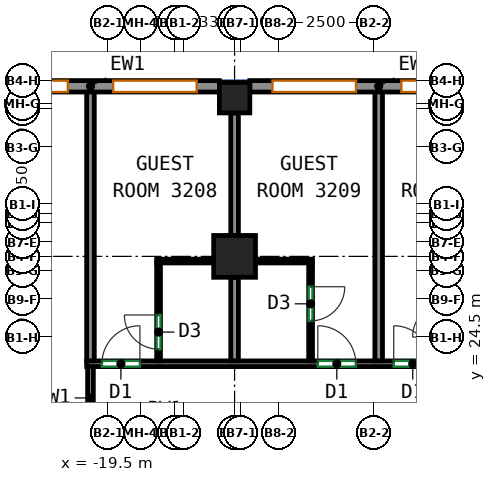
"""IFC4 building model, lengths in metres.
Left out: names, types, materials, properties, quantities, classifications, styles, units other than length and angle.
Written with IfcOpenShell. Run it as: python <this file> out.ifc"""

import sys

from ifc_helpers import new_model, si_unit, direction, frame, frame_2d, origin, origin_2d, place, context, subcontext, project, spatial, rectangle, extrude, source, transform, mapped, element, fill, save


model = new_model("IFC4")
c1 = context("Model", 3, precision=1e-05, world=origin(), true_north=direction((0.0, 1.0)))
c2 = subcontext(c1, "Body", "Model", "MODEL_VIEW")
j1 = project(units=[si_unit("LENGTHUNIT", "METRE"), si_unit("PLANEANGLEUNIT", "RADIAN")], contexts=[c1])
p1 = place(None, origin())
s1 = spatial("IfcSite", under=j1, at=p1, CompositionType="ELEMENT")
p2 = place(p1, origin())
s2 = spatial("IfcBuilding", under=s1, at=p2, CompositionType="ELEMENT")
p3 = place(p2, frame((0.0, 0.0, 143.9)))
s3 = spatial("IfcBuildingStorey", under=s2, at=p3, CompositionType="ELEMENT", Elevation=143.9)
m1 = source(origin(), c2, "Body", "SweptSolid", [
    extrude(rectangle(XDim=1.1, YDim=1.1, at=origin_2d()), origin(), (0.0, 0.0, 1.0), 3.12),
])
p4 = place(p3, frame((-16.167, 26.625, 0.0), z_axis=(0.0, 0.0, 1.0), x_axis=(1.0, 0.0, 0.0)))
e1 = element("IfcColumn", 1, at=p4, inside=s3, PredefinedType="COLUMN", context=c2, shape_type="MappedRepresentation", body=[
    mapped(m1, transform((0.0, 0.0, 0.0))),
])
m2 = source(origin(), c2, "Body", "SweptSolid", [
    extrude(rectangle(XDim=0.8, YDim=0.8, at=origin_2d()), origin(), (0.0, 0.0, 1.0), 3.12),
])
p5 = place(p3, frame((-16.167, 30.8, 0.0), z_axis=(0.0, 0.0, 1.0), x_axis=(1.0, 0.0, 0.0)))
e2 = element("IfcColumn", 2, at=p5, inside=s3, PredefinedType="COLUMN", context=c2, shape_type="MappedRepresentation", body=[
    mapped(m2, transform((0.0, 0.0, 0.0))),
])
m3 = source(origin(), c2, "Body", "SweptSolid", [
    extrude(rectangle(XDim=6.783, YDim=0.3, at=frame_2d((3.392, 0.0))), origin(), (0.0, 0.0, 1.0), 3.12),
])
p6 = place(p3, frame((-8.983, 31.1, 0.0), z_axis=(0.0, 0.0, 1.0), x_axis=(-1.0, 0.0, 0.0)))
e3 = element("IfcWall", 3, at=p6, inside=s3, PredefinedType="SOLIDWALL", context=c2, shape_type="MappedRepresentation", body=[
    mapped(m3, transform((0.0, 0.0, 0.0))),
])
p7 = place(p6, frame((0.596, 0.0, 0.85)))
e4 = element("IfcOpeningElement", 4, at=p7, cuts=e3, PredefinedType="OPENING", context=c2, shape_type="SweptSolid", body=[
    extrude(rectangle(XDim=2.2, YDim=1.95, at=frame_2d((1.1, 0.975))), frame((0.0, 0.16, 0.0), z_axis=(0.0, -1.0, 0.0), x_axis=(1.0, 0.0, 0.0)), (0.0, 0.0, 1.0), 0.32),
])
p8 = place(p6, frame((3.988, 0.0, 0.85)))
e5 = element("IfcOpeningElement", 5, at=p8, cuts=e3, PredefinedType="OPENING", context=c2, shape_type="SweptSolid", body=[
    extrude(rectangle(XDim=2.2, YDim=1.95, at=frame_2d((1.1, 0.975))), frame((0.0, 0.16, 0.0), z_axis=(0.0, -1.0, 0.0), x_axis=(1.0, 0.0, 0.0)), (0.0, 0.0, 1.0), 0.32),
])
m4 = source(origin(), c2, "Body", "SweptSolid", [
    extrude(rectangle(XDim=6.783, YDim=0.3, at=frame_2d((3.392, 0.0))), origin(), (0.0, 0.0, 1.0), 3.12),
])
p9 = place(p3, frame((-16.567, 31.1, 0.0), z_axis=(0.0, 0.0, 1.0), x_axis=(-1.0, 0.0, 0.0)))
e6 = element("IfcWall", 6, at=p9, inside=s3, PredefinedType="SOLIDWALL", context=c2, shape_type="MappedRepresentation", body=[
    mapped(m4, transform((0.0, 0.0, 0.0))),
])
p10 = place(p9, frame((0.596, 0.0, 0.85)))
e7 = element("IfcOpeningElement", 7, at=p10, cuts=e6, PredefinedType="OPENING", context=c2, shape_type="SweptSolid", body=[
    extrude(rectangle(XDim=2.2, YDim=1.95, at=frame_2d((1.1, 0.975))), frame((0.0, 0.16, 0.0), z_axis=(0.0, -1.0, 0.0), x_axis=(1.0, 0.0, 0.0)), (0.0, 0.0, 1.0), 0.32),
])
p11 = place(p9, frame((3.988, 0.0, 0.85)))
e8 = element("IfcOpeningElement", 8, at=p11, cuts=e6, PredefinedType="OPENING", context=c2, shape_type="SweptSolid", body=[
    extrude(rectangle(XDim=2.2, YDim=1.95, at=frame_2d((1.1, 0.975))), frame((0.0, 0.16, 0.0), z_axis=(0.0, -1.0, 0.0), x_axis=(1.0, 0.0, 0.0)), (0.0, 0.0, 1.0), 0.32),
])
p12 = place(p3, frame((-19.959, 22.075, 0.0), z_axis=(0.0, 0.0, 1.0), x_axis=(0.0, 1.0, 0.0)))
e9 = element("IfcWall", 9, at=p12, inside=s3, PredefinedType="PARTITIONING", context=c2, shape_type="SweptSolid", body=[
    extrude(rectangle(XDim=1.65, YDim=0.15, at=frame_2d((0.825, 0.0))), origin(), (0.0, 0.0, 1.0), 3.12),
])
p13 = place(p3, frame((-20.059, 23.8, 0.0), z_axis=(0.0, 0.0, 1.0), x_axis=(1.0, 0.0, 0.0)))
e10 = element("IfcWall", 10, at=p13, inside=s3, PredefinedType="PARTITIONING", context=c2, shape_type="SweptSolid", body=[
    extrude(rectangle(XDim=41.909, YDim=0.15, at=frame_2d((20.955, 0.0))), origin(), (0.0, 0.0, 1.0), 3.12),
])
p14 = place(p13, frame((0.401, 0.0, 0.0)))
e11 = element("IfcOpeningElement", 11, at=p14, cuts=e10, PredefinedType="OPENING", context=c2, shape_type="SweptSolid", body=[
    extrude(rectangle(XDim=1.0, YDim=2.1, at=frame_2d((0.5, 1.05))), frame((0.0, 0.085, 0.0), z_axis=(0.0, -1.0, 0.0), x_axis=(1.0, 0.0, 0.0)), (0.0, 0.0, 1.0), 0.17),
])
p15 = place(p13, frame((6.082, 0.0, 0.0)))
e12 = element("IfcOpeningElement", 12, at=p15, cuts=e10, PredefinedType="OPENING", context=c2, shape_type="SweptSolid", body=[
    extrude(rectangle(XDim=1.0, YDim=2.1, at=frame_2d((0.5, 1.05))), frame((0.0, 0.085, 0.0), z_axis=(0.0, -1.0, 0.0), x_axis=(1.0, 0.0, 0.0)), (0.0, 0.0, 1.0), 0.17),
])
p16 = place(p13, frame((8.08, 0.0, 0.0)))
e13 = element("IfcOpeningElement", 13, at=p16, cuts=e10, PredefinedType="OPENING", context=c2, shape_type="SweptSolid", body=[
    extrude(rectangle(XDim=1.0, YDim=2.1, at=frame_2d((0.5, 1.05))), frame((0.0, 0.085, 0.0), z_axis=(0.0, -1.0, 0.0), x_axis=(1.0, 0.0, 0.0)), (0.0, 0.0, 1.0), 0.17),
])
p17 = place(p13, frame((13.769, 0.0, 0.0)))
e14 = element("IfcOpeningElement", 14, at=p17, cuts=e10, PredefinedType="OPENING", context=c2, shape_type="SweptSolid", body=[
    extrude(rectangle(XDim=1.0, YDim=2.1, at=frame_2d((0.5, 1.05))), frame((0.0, 0.085, 0.0), z_axis=(0.0, -1.0, 0.0), x_axis=(1.0, 0.0, 0.0)), (0.0, 0.0, 1.0), 0.17),
])
p18 = place(p13, frame((15.56, 0.0, 0.0)))
e15 = element("IfcOpeningElement", 15, at=p18, cuts=e10, PredefinedType="OPENING", context=c2, shape_type="SweptSolid", body=[
    extrude(rectangle(XDim=1.0, YDim=2.1, at=frame_2d((0.5, 1.05))), frame((0.0, 0.085, 0.0), z_axis=(0.0, -1.0, 0.0), x_axis=(1.0, 0.0, 0.0)), (0.0, 0.0, 1.0), 0.17),
])
p19 = place(p13, frame((21.625, 0.0, 0.0)))
e16 = element("IfcOpeningElement", 16, at=p19, cuts=e10, PredefinedType="OPENING", context=c2, shape_type="SweptSolid", body=[
    extrude(rectangle(XDim=1.0, YDim=2.1, at=frame_2d((0.5, 1.05))), frame((0.0, 0.085, 0.0), z_axis=(0.0, -1.0, 0.0), x_axis=(1.0, 0.0, 0.0)), (0.0, 0.0, 1.0), 0.17),
])
p20 = place(p13, frame((23.212, 0.0, 0.0)))
e17 = element("IfcOpeningElement", 17, at=p20, cuts=e10, PredefinedType="OPENING", context=c2, shape_type="SweptSolid", body=[
    extrude(rectangle(XDim=1.0, YDim=2.1, at=frame_2d((0.5, 1.05))), frame((0.0, 0.085, 0.0), z_axis=(0.0, -1.0, 0.0), x_axis=(1.0, 0.0, 0.0)), (0.0, 0.0, 1.0), 0.17),
])
p21 = place(p13, frame((29.038, 0.0, 0.0)))
e18 = element("IfcOpeningElement", 18, at=p21, cuts=e10, PredefinedType="OPENING", context=c2, shape_type="SweptSolid", body=[
    extrude(rectangle(XDim=1.0, YDim=2.1, at=frame_2d((0.5, 1.05))), frame((0.0, 0.085, 0.0), z_axis=(0.0, -1.0, 0.0), x_axis=(1.0, 0.0, 0.0)), (0.0, 0.0, 1.0), 0.17),
])
p22 = place(p13, frame((30.624, 0.0, 0.0)))
e19 = element("IfcOpeningElement", 19, at=p22, cuts=e10, PredefinedType="OPENING", context=c2, shape_type="SweptSolid", body=[
    extrude(rectangle(XDim=1.0, YDim=2.1, at=frame_2d((0.5, 1.05))), frame((0.0, 0.085, 0.0), z_axis=(0.0, -1.0, 0.0), x_axis=(1.0, 0.0, 0.0)), (0.0, 0.0, 1.0), 0.17),
])
p23 = place(p13, frame((36.622, 0.0, 0.0)))
e20 = element("IfcOpeningElement", 20, at=p23, cuts=e10, PredefinedType="OPENING", context=c2, shape_type="SweptSolid", body=[
    extrude(rectangle(XDim=1.0, YDim=2.1, at=frame_2d((0.5, 1.05))), frame((0.0, 0.085, 0.0), z_axis=(0.0, -1.0, 0.0), x_axis=(1.0, 0.0, 0.0)), (0.0, 0.0, 1.0), 0.17),
])
p24 = place(p13, frame((38.516, 0.0, 0.0)))
e21 = element("IfcOpeningElement", 21, at=p24, cuts=e10, PredefinedType="OPENING", context=c2, shape_type="SweptSolid", body=[
    extrude(rectangle(XDim=1.0, YDim=2.1, at=frame_2d((0.5, 1.05))), frame((0.0, 0.085, 0.0), z_axis=(0.0, -1.0, 0.0), x_axis=(1.0, 0.0, 0.0)), (0.0, 0.0, 1.0), 0.17),
])
p25 = place(p3, frame((-19.959, 23.877, 0.0), z_axis=(0.0, 0.0, 1.0), x_axis=(0.0, 1.0, 0.0)))
e22 = element("IfcWall", 22, at=p25, inside=s3, PredefinedType="PARTITIONING", context=c2, shape_type="SweptSolid", body=[
    extrude(rectangle(XDim=7.123, YDim=0.2, at=frame_2d((3.562, 0.0))), origin(), (0.0, 0.0, 1.0), 3.12),
])
p26 = place(p3, frame((-18.217, 26.502, 0.0), z_axis=(0.0, 0.0, 1.0), x_axis=(1.0, 0.0, 0.0)))
e23 = element("IfcWall", 23, at=p26, inside=s3, PredefinedType="PARTITIONING", context=c2, shape_type="SweptSolid", body=[
    extrude(rectangle(XDim=1.5, YDim=0.1, at=frame_2d((0.75, 0.0))), origin(), (0.0, 0.0, 1.0), 3.12),
])
p27 = place(p3, frame((-18.167, 23.877, 0.0), z_axis=(0.0, 0.0, 1.0), x_axis=(0.0, 1.0, 0.0)))
e24 = element("IfcWall", 24, at=p27, inside=s3, PredefinedType="PARTITIONING", context=c2, shape_type="SweptSolid", body=[
    extrude(rectangle(XDim=2.575, YDim=0.1, at=frame_2d((1.288, 0.0))), origin(), (0.0, 0.0, 1.0), 3.12),
])
p28 = place(p27, frame((0.306, 0.0, 0.0)))
e25 = element("IfcOpeningElement", 25, at=p28, cuts=e24, PredefinedType="OPENING", context=c2, shape_type="SweptSolid", body=[
    extrude(rectangle(XDim=0.9, YDim=2.1, at=frame_2d((0.45, 1.05))), frame((0.0, 0.06, 0.0), z_axis=(0.0, -1.0, 0.0), x_axis=(1.0, 0.0, 0.0)), (0.0, 0.0, 1.0), 0.12),
])
p29 = place(p3, frame((-16.167, 27.175, 0.0), z_axis=(0.0, 0.0, 1.0), x_axis=(0.0, 1.0, 0.0)))
e26 = element("IfcWall", 26, at=p29, inside=s3, PredefinedType="PARTITIONING", context=c2, shape_type="SweptSolid", body=[
    extrude(rectangle(XDim=3.225, YDim=0.2, at=frame_2d((1.612, 0.0))), origin(), (0.0, 0.0, 1.0), 3.12),
])
p30 = place(p3, frame((-16.167, 23.877, 0.0), z_axis=(0.0, 0.0, 1.0), x_axis=(0.0, 1.0, 0.0)))
e27 = element("IfcWall", 27, at=p30, inside=s3, PredefinedType="PARTITIONING", context=c2, shape_type="SweptSolid", body=[
    extrude(rectangle(XDim=2.198, YDim=0.2, at=frame_2d((1.099, 0.0))), origin(), (0.0, 0.0, 1.0), 3.12),
])
p31 = place(p3, frame((-15.617, 26.502, 0.0), z_axis=(0.0, 0.0, 1.0), x_axis=(1.0, 0.0, 0.0)))
e28 = element("IfcWall", 28, at=p31, inside=s3, PredefinedType="PARTITIONING", context=c2, shape_type="SweptSolid", body=[
    extrude(rectangle(XDim=1.5, YDim=0.1, at=frame_2d((0.75, 0.0))), origin(), (0.0, 0.0, 1.0), 3.12),
])
p32 = place(p3, frame((-14.167, 26.452, 0.0), z_axis=(0.0, 0.0, 1.0), x_axis=(0.0, -1.0, 0.0)))
e29 = element("IfcWall", 29, at=p32, inside=s3, PredefinedType="PARTITIONING", context=c2, shape_type="SweptSolid", body=[
    extrude(rectangle(XDim=2.575, YDim=0.1, at=frame_2d((1.288, 0.0))), origin(), (0.0, 0.0, 1.0), 3.12),
])
p33 = place(p32, frame((0.625, 0.0, 0.0)))
e30 = element("IfcOpeningElement", 30, at=p33, cuts=e29, PredefinedType="OPENING", context=c2, shape_type="SweptSolid", body=[
    extrude(rectangle(XDim=0.9, YDim=2.1, at=frame_2d((0.45, 1.05))), frame((0.0, 0.06, 0.0), z_axis=(0.0, -1.0, 0.0), x_axis=(1.0, 0.0, 0.0)), (0.0, 0.0, 1.0), 0.12),
])
p34 = place(p3, frame((-12.375, 23.877, 0.0), z_axis=(0.0, 0.0, 1.0), x_axis=(0.0, 1.0, 0.0)))
e31 = element("IfcWall", 31, at=p34, inside=s3, PredefinedType="PARTITIONING", context=c2, shape_type="SweptSolid", body=[
    extrude(rectangle(XDim=7.123, YDim=0.2, at=frame_2d((3.562, 0.0))), origin(), (0.0, 0.0, 1.0), 3.12),
])
p35 = place(p7, origin())
e32 = element("IfcWindow", 32, at=p35, inside=s3, PartitioningType="SINGLE_PANEL", PredefinedType="WINDOW", context=c2, shape_type="SweptSolid", body=[
    extrude(rectangle(XDim=2.2, YDim=1.95, at=frame_2d((1.1, 0.975))), frame((0.0, 0.03, 0.0), z_axis=(0.0, -1.0, 0.0), x_axis=(1.0, 0.0, 0.0)), (0.0, 0.0, 1.0), 0.06),
])
fill(e4, e32)
p36 = place(p8, origin())
e33 = element("IfcWindow", 33, at=p36, inside=s3, PartitioningType="SINGLE_PANEL", PredefinedType="WINDOW", context=c2, shape_type="SweptSolid", body=[
    extrude(rectangle(XDim=2.2, YDim=1.95, at=frame_2d((1.1, 0.975))), frame((0.0, 0.03, 0.0), z_axis=(0.0, -1.0, 0.0), x_axis=(1.0, 0.0, 0.0)), (0.0, 0.0, 1.0), 0.06),
])
fill(e5, e33)
p37 = place(p10, origin())
e34 = element("IfcWindow", 34, at=p37, inside=s3, PartitioningType="SINGLE_PANEL", PredefinedType="WINDOW", context=c2, shape_type="SweptSolid", body=[
    extrude(rectangle(XDim=2.2, YDim=1.95, at=frame_2d((1.1, 0.975))), frame((0.0, 0.03, 0.0), z_axis=(0.0, -1.0, 0.0), x_axis=(1.0, 0.0, 0.0)), (0.0, 0.0, 1.0), 0.06),
])
fill(e7, e34)
p38 = place(p11, origin())
e35 = element("IfcWindow", 35, at=p38, inside=s3, PartitioningType="SINGLE_PANEL", PredefinedType="WINDOW", context=c2, shape_type="SweptSolid", body=[
    extrude(rectangle(XDim=2.2, YDim=1.95, at=frame_2d((1.1, 0.975))), frame((0.0, 0.03, 0.0), z_axis=(0.0, -1.0, 0.0), x_axis=(1.0, 0.0, 0.0)), (0.0, 0.0, 1.0), 0.06),
])
fill(e8, e35)
p39 = place(p14, origin())
e36 = element("IfcDoor", 36, at=p39, inside=s3, OperationType="SINGLE_SWING_RIGHT", PredefinedType="DOOR", context=c2, shape_type="SweptSolid", body=[
    extrude(rectangle(XDim=1.0, YDim=2.1, at=frame_2d((0.5, 1.05))), frame((0.0, 0.025, 0.0), z_axis=(0.0, -1.0, 0.0), x_axis=(1.0, 0.0, 0.0)), (0.0, 0.0, 1.0), 0.05),
])
fill(e11, e36)
p40 = place(p15, origin())
e37 = element("IfcDoor", 37, at=p40, inside=s3, OperationType="SINGLE_SWING_LEFT", PredefinedType="DOOR", context=c2, shape_type="SweptSolid", body=[
    extrude(rectangle(XDim=1.0, YDim=2.1, at=frame_2d((0.5, 1.05))), frame((0.0, 0.025, 0.0), z_axis=(0.0, -1.0, 0.0), x_axis=(1.0, 0.0, 0.0)), (0.0, 0.0, 1.0), 0.05),
])
fill(e12, e37)
p41 = place(p16, origin())
e38 = element("IfcDoor", 38, at=p41, inside=s3, OperationType="SINGLE_SWING_LEFT", PredefinedType="DOOR", context=c2, shape_type="SweptSolid", body=[
    extrude(rectangle(XDim=1.0, YDim=2.1, at=frame_2d((0.5, 1.05))), frame((0.0, 0.025, 0.0), z_axis=(0.0, -1.0, 0.0), x_axis=(1.0, 0.0, 0.0)), (0.0, 0.0, 1.0), 0.05),
])
fill(e13, e38)
p42 = place(p28, origin())
e39 = element("IfcDoor", 39, at=p42, inside=s3, OperationType="SINGLE_SWING_RIGHT", PredefinedType="DOOR", context=c2, shape_type="SweptSolid", body=[
    extrude(rectangle(XDim=0.9, YDim=2.1, at=frame_2d((0.45, 1.05))), frame((0.0, 0.025, 0.0), z_axis=(0.0, -1.0, 0.0), x_axis=(1.0, 0.0, 0.0)), (0.0, 0.0, 1.0), 0.05),
])
fill(e25, e39)
p43 = place(p33, origin())
e40 = element("IfcDoor", 40, at=p43, inside=s3, OperationType="SINGLE_SWING_LEFT", PredefinedType="DOOR", context=c2, shape_type="SweptSolid", body=[
    extrude(rectangle(XDim=0.9, YDim=2.1, at=frame_2d((0.45, 1.05))), frame((0.0, 0.025, 0.0), z_axis=(0.0, -1.0, 0.0), x_axis=(1.0, 0.0, 0.0)), (0.0, 0.0, 1.0), 0.05),
])
fill(e30, e40)
save(model, sys.argv[1])
